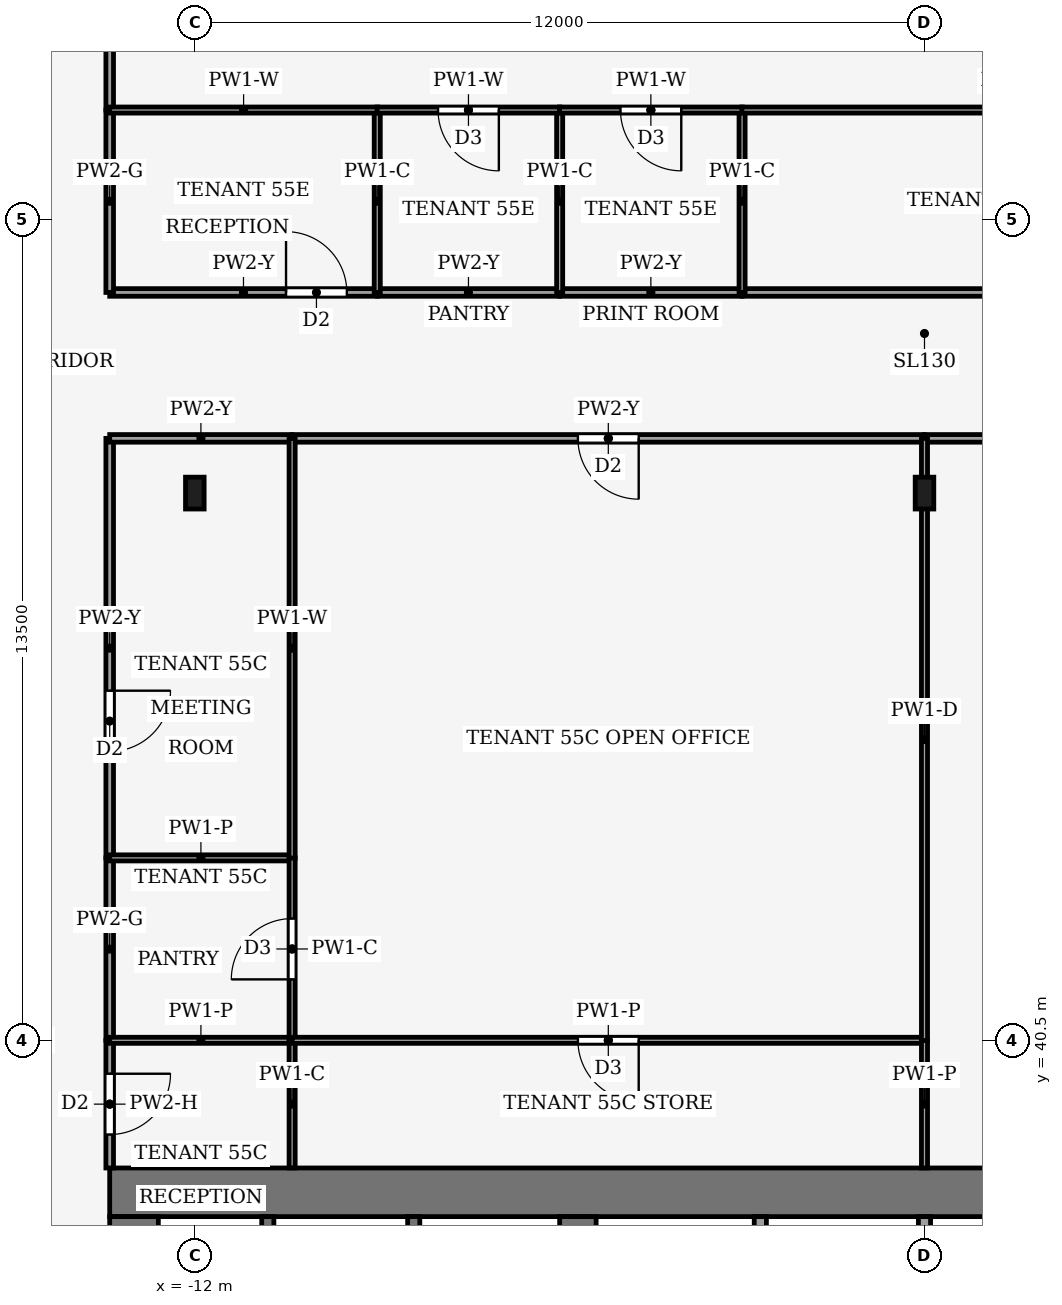
"""IFC4 building model, lengths in metres.
Left out: names, types, materials, properties, quantities, classifications, styles, units other than length and angle.
Written with IfcOpenShell. Run it as: python <this file> out.ifc"""

import sys

from ifc_helpers import new_model, si_unit, direction, frame, frame_2d, origin, origin_2d, place, context, subcontext, project, spatial, rectangle, i_section, extrude, element, fill, save


model = new_model("IFC4")
c1 = context("Model", 3, precision=1e-05, world=origin(), true_north=direction((0.0, 1.0)))
c2 = subcontext(c1, "Body", "Model", "MODEL_VIEW")
j1 = project(units=[si_unit("LENGTHUNIT", "METRE"), si_unit("PLANEANGLEUNIT", "RADIAN")], contexts=[c1])
p1 = place(None, origin())
s1 = spatial("IfcSite", under=j1, at=p1, CompositionType="ELEMENT")
p2 = place(p1, origin())
s2 = spatial("IfcBuilding", under=s1, at=p2, CompositionType="ELEMENT")
p3 = place(p2, frame((0.0, 0.0, 242.0)))
s3 = spatial("IfcBuildingStorey", under=s2, at=p3, CompositionType="ELEMENT", Elevation=242.0)
p4 = place(p3, frame((-13.4, 38.0, -0.13), z_axis=(0.0, 0.0, 1.0), x_axis=(1.0, 0.0, 0.0)))
e1 = element("IfcWall", 1, at=p4, inside=s3, PredefinedType="SHEAR", context=c2, shape_type="SweptSolid", body=[
    extrude(rectangle(XDim=26.8, YDim=0.8, at=frame_2d((13.4, 0.0))), origin(), (0.0, 0.0, 1.0), 4.0),
])
p5 = place(p3, frame((-13.0, 18.4, -0.13), z_axis=(0.0, 0.0, 1.0), x_axis=(0.0, 1.0, 0.0)))
e2 = element("IfcWall", 2, at=p5, inside=s3, PredefinedType="SHEAR", context=c2, shape_type="SweptSolid", body=[
    extrude(rectangle(XDim=19.2, YDim=0.8, at=frame_2d((9.6, 0.0))), origin(), (0.0, 0.0, 1.0), 4.0),
])
p6 = place(p5, frame((2.8, 0.0, 0.13)))
e3 = element("IfcOpeningElement", 3, at=p6, cuts=e2, PredefinedType="OPENING", context=c2, shape_type="SweptSolid", body=[
    extrude(rectangle(XDim=2.4, YDim=2.4, at=frame_2d((1.2, 1.2))), frame((0.0, 0.41, 0.0), z_axis=(0.0, -1.0, 0.0), x_axis=(1.0, 0.0, 0.0)), (0.0, 0.0, 1.0), 0.82),
])
p7 = place(p5, frame((13.4, 0.0, 0.13)))
e4 = element("IfcOpeningElement", 4, at=p7, cuts=e2, PredefinedType="OPENING", context=c2, shape_type="SweptSolid", body=[
    extrude(rectangle(XDim=1.4, YDim=2.2, at=frame_2d((0.7, 1.1))), frame((0.0, 0.41, 0.0), z_axis=(0.0, -1.0, 0.0), x_axis=(1.0, 0.0, 0.0)), (0.0, 0.0, 1.0), 0.82),
])
p8 = place(p3, frame((-5.7, 18.4, -0.13), z_axis=(0.0, 0.0, 1.0), x_axis=(0.0, 1.0, 0.0)))
e5 = element("IfcWall", 5, at=p8, inside=s3, PredefinedType="SHEAR", context=c2, shape_type="SweptSolid", body=[
    extrude(rectangle(XDim=19.2, YDim=0.6, at=frame_2d((9.6, 0.0))), origin(), (0.0, 0.0, 1.0), 4.0),
])
p9 = place(p8, frame((8.35, 0.0, 0.13)))
e6 = element("IfcOpeningElement", 6, at=p9, cuts=e5, PredefinedType="OPENING", context=c2, shape_type="SweptSolid", body=[
    extrude(rectangle(XDim=0.9, YDim=2.1, at=frame_2d((0.45, 1.05))), frame((0.0, 0.31, 0.0), z_axis=(0.0, -1.0, 0.0), x_axis=(1.0, 0.0, 0.0)), (0.0, 0.0, 1.0), 0.62),
])
for number, where, z_axis, x_axis in (
    (7, (-12.0, 49.5, 0.0), (0.0, 0.0, 1.0), (1.0, 0.0, 0.0)),
    (8, (0.0, 49.5, 0.0), (0.0, 0.0, 1.0), (1.0, 0.0, 0.0)),
):
    element("IfcColumn", number, at=place(p3, frame(where, z_axis=z_axis, x_axis=x_axis)), inside=s3, PredefinedType="COLUMN", context=c2, shape_type="SweptSolid", body=[
        extrude(i_section(OverallWidth=0.306, OverallDepth=0.524, WebThickness=0.012, FlangeThickness=0.04, FilletRadius=0.027, at=origin_2d()), origin(), (0.0, 0.0, 1.0), 4.0),
    ])
for number, where, z_axis, x_axis in (
    (9, (-10.8, 34.0, 0.0), (0.0, 0.0, 1.0), (0.0, 1.0, 0.0)),
    (10, (-8.4, 34.0, 0.0), (0.0, 0.0, 1.0), (0.0, 1.0, 0.0)),
    (11, (-2.7, 34.0, 0.0), (0.0, 0.0, 1.0), (0.0, 1.0, 0.0)),
    (12, (0.0, 34.0, 0.0), (0.0, 0.0, 1.0), (0.0, 1.0, 0.0)),
):
    element("IfcWall", number, at=place(p3, frame(where, z_axis=z_axis, x_axis=x_axis)), inside=s3, PredefinedType="PARTITIONING", context=c2, shape_type="SweptSolid", body=[
        extrude(rectangle(XDim=3.6, YDim=0.2, at=frame_2d((1.8, 0.0))), origin(), (0.0, 0.0, 1.0), 3.87),
    ])
p10 = place(p3, frame((-13.4, 40.5, 0.0), z_axis=(0.0, 0.0, 1.0), x_axis=(0.0, -1.0, 0.0)))
e13 = element("IfcWall", 13, at=p10, inside=s3, PredefinedType="PARTITIONING", context=c2, shape_type="SweptSolid", body=[
    extrude(rectangle(XDim=2.1, YDim=0.125, at=frame_2d((1.05, 0.0))), origin(), (0.0, 0.0, 1.0), 3.14),
])
p11 = place(p10, frame((0.55, 0.0, 0.0)))
e14 = element("IfcOpeningElement", 14, at=p11, cuts=e13, PredefinedType="OPENING", context=c2, shape_type="SweptSolid", body=[
    extrude(rectangle(XDim=1.0, YDim=2.1, at=frame_2d((0.5, 1.05))), frame((0.0, 0.073, 0.0), z_axis=(0.0, -1.0, 0.0), x_axis=(1.0, 0.0, 0.0)), (0.0, 0.0, 1.0), 0.145),
])
p12 = place(p3, frame((-13.4, 40.5, 0.0), z_axis=(0.0, 0.0, 1.0), x_axis=(0.0, 1.0, 0.0)))
e15 = element("IfcWall", 15, at=p12, inside=s3, PredefinedType="PARTITIONING", context=c2, shape_type="SweptSolid", body=[
    extrude(rectangle(XDim=3.0, YDim=0.125, at=frame_2d((1.5, 0.0))), origin(), (0.0, 0.0, 1.0), 3.87),
])
p13 = place(p3, frame((-13.4, 50.4, 0.0), z_axis=(0.0, 0.0, 1.0), x_axis=(0.0, -1.0, 0.0)))
e16 = element("IfcWall", 16, at=p13, inside=s3, PredefinedType="PARTITIONING", context=c2, shape_type="SweptSolid", body=[
    extrude(rectangle(XDim=6.9, YDim=0.125, at=frame_2d((3.45, 0.0))), origin(), (0.0, 0.0, 1.0), 3.24),
])
p14 = place(p13, frame((4.15, 0.0, 0.0)))
e17 = element("IfcOpeningElement", 17, at=p14, cuts=e16, PredefinedType="OPENING", context=c2, shape_type="SweptSolid", body=[
    extrude(rectangle(XDim=1.0, YDim=2.1, at=frame_2d((0.5, 1.05))), frame((0.0, 0.073, 0.0), z_axis=(0.0, -1.0, 0.0), x_axis=(1.0, 0.0, 0.0)), (0.0, 0.0, 1.0), 0.145),
])
p15 = place(p3, frame((-10.4, 50.4, 0.0), z_axis=(0.0, 0.0, 1.0), x_axis=(-1.0, 0.0, 0.0)))
e18 = element("IfcWall", 18, at=p15, inside=s3, PredefinedType="PARTITIONING", context=c2, shape_type="SweptSolid", body=[
    extrude(rectangle(XDim=3.0, YDim=0.125, at=frame_2d((1.5, 0.0))), origin(), (0.0, 0.0, 1.0), 3.24),
])
p16 = place(p3, frame((0.0, 50.4, 0.0), z_axis=(0.0, 0.0, 1.0), x_axis=(-1.0, 0.0, 0.0)))
e19 = element("IfcWall", 19, at=p16, inside=s3, PredefinedType="PARTITIONING", context=c2, shape_type="SweptSolid", body=[
    extrude(rectangle(XDim=10.4, YDim=0.125, at=frame_2d((5.2, 0.0))), origin(), (0.0, 0.0, 1.0), 3.24),
])
p17 = place(p16, frame((4.7, 0.0, 0.0)))
e20 = element("IfcOpeningElement", 20, at=p17, cuts=e19, PredefinedType="OPENING", context=c2, shape_type="SweptSolid", body=[
    extrude(rectangle(XDim=1.0, YDim=2.1, at=frame_2d((0.5, 1.05))), frame((0.0, 0.073, 0.0), z_axis=(0.0, -1.0, 0.0), x_axis=(1.0, 0.0, 0.0)), (0.0, 0.0, 1.0), 0.145),
])
p18 = place(p3, frame((10.4, 50.4, 0.0), z_axis=(0.0, 0.0, 1.0), x_axis=(-1.0, 0.0, 0.0)))
e21 = element("IfcWall", 21, at=p18, inside=s3, PredefinedType="PARTITIONING", context=c2, shape_type="SweptSolid", body=[
    extrude(rectangle(XDim=10.4, YDim=0.125, at=frame_2d((5.2, 0.0))), origin(), (0.0, 0.0, 1.0), 3.24),
])
p19 = place(p18, frame((4.7, 0.0, 0.0)))
e22 = element("IfcOpeningElement", 22, at=p19, cuts=e21, PredefinedType="OPENING", context=c2, shape_type="SweptSolid", body=[
    extrude(rectangle(XDim=1.0, YDim=2.1, at=frame_2d((0.5, 1.05))), frame((0.0, 0.073, 0.0), z_axis=(0.0, -1.0, 0.0), x_axis=(1.0, 0.0, 0.0)), (0.0, 0.0, 1.0), 0.145),
])
p20 = place(p3, frame((-13.4, 52.8, 0.0), z_axis=(0.0, 0.0, 1.0), x_axis=(1.0, 0.0, 0.0)))
e23 = element("IfcWall", 23, at=p20, inside=s3, PredefinedType="PARTITIONING", context=c2, shape_type="SweptSolid", body=[
    extrude(rectangle(XDim=4.4, YDim=0.125, at=frame_2d((2.2, 0.0))), origin(), (0.0, 0.0, 1.0), 3.24),
])
p21 = place(p20, frame((2.9, 0.0, 0.0)))
e24 = element("IfcOpeningElement", 24, at=p21, cuts=e23, PredefinedType="OPENING", context=c2, shape_type="SweptSolid", body=[
    extrude(rectangle(XDim=1.0, YDim=2.1, at=frame_2d((0.5, 1.05))), frame((0.0, 0.073, 0.0), z_axis=(0.0, -1.0, 0.0), x_axis=(1.0, 0.0, 0.0)), (0.0, 0.0, 1.0), 0.145),
])
p22 = place(p3, frame((-13.4, 52.8, 0.0), z_axis=(0.0, 0.0, 1.0), x_axis=(0.0, 1.0, 0.0)))
e25 = element("IfcWall", 25, at=p22, inside=s3, PredefinedType="PARTITIONING", context=c2, shape_type="SweptSolid", body=[
    extrude(rectangle(XDim=3.0, YDim=0.125, at=frame_2d((1.5, 0.0))), origin(), (0.0, 0.0, 1.0), 3.87),
])
for number, where, z_axis, x_axis in (
    (26, (-6.0, 52.8, 0.0), (0.0, 0.0, 1.0), (-1.0, 0.0, 0.0)),
    (27, (-3.0, 52.8, 0.0), (0.0, 0.0, 1.0), (-1.0, 0.0, 0.0)),
):
    element("IfcWall", number, at=place(p3, frame(where, z_axis=z_axis, x_axis=x_axis)), inside=s3, PredefinedType="PARTITIONING", context=c2, shape_type="SweptSolid", body=[
        extrude(rectangle(XDim=3.0, YDim=0.125, at=frame_2d((1.5, 0.0))), origin(), (0.0, 0.0, 1.0), 3.24),
    ])
p23 = place(p3, frame((-3.0, 52.8, 0.0), z_axis=(0.0, 0.0, 1.0), x_axis=(1.0, 0.0, 0.0)))
e28 = element("IfcWall", 28, at=p23, inside=s3, PredefinedType="PARTITIONING", context=c2, shape_type="SweptSolid", body=[
    extrude(rectangle(XDim=9.0, YDim=0.125, at=frame_2d((4.5, 0.0))), origin(), (0.0, 0.0, 1.0), 3.24),
])
p24 = place(p23, frame((4.8, 0.0, 0.0)))
e29 = element("IfcOpeningElement", 29, at=p24, cuts=e28, PredefinedType="OPENING", context=c2, shape_type="SweptSolid", body=[
    extrude(rectangle(XDim=1.0, YDim=2.1, at=frame_2d((0.5, 1.05))), frame((0.0, 0.073, 0.0), z_axis=(0.0, -1.0, 0.0), x_axis=(1.0, 0.0, 0.0)), (0.0, 0.0, 1.0), 0.145),
])
p25 = place(p3, frame((-13.4, 61.5, 0.0), z_axis=(0.0, 0.0, 1.0), x_axis=(0.0, -1.0, 0.0)))
e30 = element("IfcWall", 30, at=p25, inside=s3, PredefinedType="PARTITIONING", context=c2, shape_type="SweptSolid", body=[
    extrude(rectangle(XDim=5.7, YDim=0.125, at=frame_2d((2.85, 0.0))), origin(), (0.0, 0.0, 1.0), 3.87),
])
p26 = place(p25, frame((2.35, 0.0, 0.0)))
e31 = element("IfcOpeningElement", 31, at=p26, cuts=e30, PredefinedType="OPENING", context=c2, shape_type="SweptSolid", body=[
    extrude(rectangle(XDim=1.0, YDim=2.1, at=frame_2d((0.5, 1.05))), frame((0.0, 0.073, 0.0), z_axis=(0.0, -1.0, 0.0), x_axis=(1.0, 0.0, 0.0)), (0.0, 0.0, 1.0), 0.145),
])
p27 = place(p3, frame((-10.4, 40.5, 0.0), z_axis=(0.0, 0.0, 1.0), x_axis=(-1.0, 0.0, 0.0)))
e32 = element("IfcWall", 32, at=p27, inside=s3, PredefinedType="PARTITIONING", context=c2, shape_type="SweptSolid", body=[
    extrude(rectangle(XDim=3.0, YDim=0.1, at=frame_2d((1.5, 0.0))), origin(), (0.0, 0.0, 1.0), 3.44),
])
p28 = place(p3, frame((-10.4, 38.4, 0.0), z_axis=(0.0, 0.0, 1.0), x_axis=(0.0, 1.0, 0.0)))
e33 = element("IfcWall", 33, at=p28, inside=s3, PredefinedType="PARTITIONING", context=c2, shape_type="SweptSolid", body=[
    extrude(rectangle(XDim=2.1, YDim=0.1, at=frame_2d((1.05, 0.0))), origin(), (0.0, 0.0, 1.0), 3.87),
])
p29 = place(p3, frame((-10.4, 43.5, 0.0), z_axis=(0.0, 0.0, 1.0), x_axis=(-1.0, 0.0, 0.0)))
e34 = element("IfcWall", 34, at=p29, inside=s3, PredefinedType="PARTITIONING", context=c2, shape_type="SweptSolid", body=[
    extrude(rectangle(XDim=3.0, YDim=0.1, at=frame_2d((1.5, 0.0))), origin(), (0.0, 0.0, 1.0), 3.44),
])
p30 = place(p3, frame((-10.4, 40.5, 0.0), z_axis=(0.0, 0.0, 1.0), x_axis=(0.0, 1.0, 0.0)))
e35 = element("IfcWall", 35, at=p30, inside=s3, PredefinedType="PARTITIONING", context=c2, shape_type="SweptSolid", body=[
    extrude(rectangle(XDim=3.004, YDim=0.1, at=frame_2d((1.502, 0.0))), origin(), (0.0, 0.0, 1.0), 3.87),
])
p31 = place(p30, frame((1.002, 0.0, 0.0)))
e36 = element("IfcOpeningElement", 36, at=p31, cuts=e35, PredefinedType="OPENING", context=c2, shape_type="SweptSolid", body=[
    extrude(rectangle(XDim=1.0, YDim=2.1, at=frame_2d((0.5, 1.05))), frame((0.0, 0.06, 0.0), z_axis=(0.0, -1.0, 0.0), x_axis=(1.0, 0.0, 0.0)), (0.0, 0.0, 1.0), 0.12),
])
p32 = place(p3, frame((-10.4, 43.496, 0.0), z_axis=(0.0, 0.0, 1.0), x_axis=(0.0, 1.0, 0.0)))
e37 = element("IfcWall", 37, at=p32, inside=s3, PredefinedType="PARTITIONING", context=c2, shape_type="SweptSolid", body=[
    extrude(rectangle(XDim=6.904, YDim=0.1, at=frame_2d((3.452, 0.0))), origin(), (0.0, 0.0, 1.0), 3.24),
])
p33 = place(p3, frame((0.0, 40.5, 0.0), z_axis=(0.0, 0.0, 1.0), x_axis=(-1.0, 0.0, 0.0)))
e38 = element("IfcWall", 38, at=p33, inside=s3, PredefinedType="PARTITIONING", context=c2, shape_type="SweptSolid", body=[
    extrude(rectangle(XDim=10.4, YDim=0.1, at=frame_2d((5.2, 0.0))), origin(), (0.0, 0.0, 1.0), 3.44),
])
p34 = place(p33, frame((4.7, 0.0, 0.0)))
e39 = element("IfcOpeningElement", 39, at=p34, cuts=e38, PredefinedType="OPENING", context=c2, shape_type="SweptSolid", body=[
    extrude(rectangle(XDim=1.0, YDim=2.1, at=frame_2d((0.5, 1.05))), frame((0.0, 0.06, 0.0), z_axis=(0.0, -1.0, 0.0), x_axis=(1.0, 0.0, 0.0)), (0.0, 0.0, 1.0), 0.12),
])
p35 = place(p3, frame((0.0, 38.4, 0.0), z_axis=(0.0, 0.0, 1.0), x_axis=(0.0, 1.0, 0.0)))
e40 = element("IfcWall", 40, at=p35, inside=s3, PredefinedType="PARTITIONING", context=c2, shape_type="SweptSolid", body=[
    extrude(rectangle(XDim=2.104, YDim=0.1, at=frame_2d((1.052, 0.0))), origin(), (0.0, 0.0, 1.0), 3.44),
])
p36 = place(p3, frame((0.0, 40.496, 0.0), z_axis=(0.0, 0.0, 1.0), x_axis=(0.0, 1.0, 0.0)))
e41 = element("IfcWall", 41, at=p36, inside=s3, PredefinedType="PARTITIONING", context=c2, shape_type="SweptSolid", body=[
    extrude(rectangle(XDim=9.904, YDim=0.1, at=frame_2d((4.952, 0.0))), origin(), (0.0, 0.0, 1.0), 3.29),
])
p37 = place(p3, frame((-9.0, 52.8, 0.0), z_axis=(0.0, 0.0, 1.0), x_axis=(0.0, 1.0, 0.0)))
e42 = element("IfcWall", 42, at=p37, inside=s3, PredefinedType="PARTITIONING", context=c2, shape_type="SweptSolid", body=[
    extrude(rectangle(XDim=3.0, YDim=0.1, at=frame_2d((1.5, 0.0))), origin(), (0.0, 0.0, 1.0), 3.87),
])
p38 = place(p3, frame((-8.996, 55.8, 0.0), z_axis=(0.0, 0.0, 1.0), x_axis=(-1.0, 0.0, 0.0)))
e43 = element("IfcWall", 43, at=p38, inside=s3, PredefinedType="PARTITIONING", context=c2, shape_type="SweptSolid", body=[
    extrude(rectangle(XDim=4.404, YDim=0.1, at=frame_2d((2.202, 0.0))), origin(), (0.0, 0.0, 1.0), 3.24),
])
p39 = place(p3, frame((-6.0, 52.8, 0.0), z_axis=(0.0, 0.0, 1.0), x_axis=(0.0, 1.0, 0.0)))
e44 = element("IfcWall", 44, at=p39, inside=s3, PredefinedType="PARTITIONING", context=c2, shape_type="SweptSolid", body=[
    extrude(rectangle(XDim=3.0, YDim=0.1, at=frame_2d((1.5, 0.0))), origin(), (0.0, 0.0, 1.0), 3.87),
])
p40 = place(p3, frame((-5.996, 55.8, 0.0), z_axis=(0.0, 0.0, 1.0), x_axis=(-1.0, 0.0, 0.0)))
e45 = element("IfcWall", 45, at=p40, inside=s3, PredefinedType="PARTITIONING", context=c2, shape_type="SweptSolid", body=[
    extrude(rectangle(XDim=3.008, YDim=0.1, at=frame_2d((1.504, 0.0))), origin(), (0.0, 0.0, 1.0), 3.24),
])
p41 = place(p40, frame((1.004, 0.0, 0.0)))
e46 = element("IfcOpeningElement", 46, at=p41, cuts=e45, PredefinedType="OPENING", context=c2, shape_type="SweptSolid", body=[
    extrude(rectangle(XDim=1.0, YDim=2.1, at=frame_2d((0.5, 1.05))), frame((0.0, 0.06, 0.0), z_axis=(0.0, -1.0, 0.0), x_axis=(1.0, 0.0, 0.0)), (0.0, 0.0, 1.0), 0.12),
])
p42 = place(p3, frame((-3.0, 52.8, 0.0), z_axis=(0.0, 0.0, 1.0), x_axis=(0.0, 1.0, 0.0)))
e47 = element("IfcWall", 47, at=p42, inside=s3, PredefinedType="PARTITIONING", context=c2, shape_type="SweptSolid", body=[
    extrude(rectangle(XDim=3.0, YDim=0.1, at=frame_2d((1.5, 0.0))), origin(), (0.0, 0.0, 1.0), 3.87),
])
p43 = place(p3, frame((-2.996, 55.8, 0.0), z_axis=(0.0, 0.0, 1.0), x_axis=(-1.0, 0.0, 0.0)))
e48 = element("IfcWall", 48, at=p43, inside=s3, PredefinedType="PARTITIONING", context=c2, shape_type="SweptSolid", body=[
    extrude(rectangle(XDim=3.008, YDim=0.1, at=frame_2d((1.504, 0.0))), origin(), (0.0, 0.0, 1.0), 3.24),
])
p44 = place(p43, frame((1.004, 0.0, 0.0)))
e49 = element("IfcOpeningElement", 49, at=p44, cuts=e48, PredefinedType="OPENING", context=c2, shape_type="SweptSolid", body=[
    extrude(rectangle(XDim=1.0, YDim=2.1, at=frame_2d((0.5, 1.05))), frame((0.0, 0.06, 0.0), z_axis=(0.0, -1.0, 0.0), x_axis=(1.0, 0.0, 0.0)), (0.0, 0.0, 1.0), 0.12),
])
p45 = place(p3, frame((6.004, 55.8, 0.0), z_axis=(0.0, 0.0, 1.0), x_axis=(-1.0, 0.0, 0.0)))
e50 = element("IfcWall", 50, at=p45, inside=s3, PredefinedType="PARTITIONING", context=c2, shape_type="SweptSolid", body=[
    extrude(rectangle(XDim=9.008, YDim=0.1, at=frame_2d((4.504, 0.0))), origin(), (0.0, 0.0, 1.0), 3.24),
])
p46 = place(p11, origin())
e51 = element("IfcDoor", 51, at=p46, inside=s3, OperationType="SINGLE_SWING_LEFT", PredefinedType="DOOR", context=c2, shape_type="SweptSolid", body=[
    extrude(rectangle(XDim=1.0, YDim=2.1, at=frame_2d((0.5, 1.05))), frame((0.0, 0.025, 0.0), z_axis=(0.0, -1.0, 0.0), x_axis=(1.0, 0.0, 0.0)), (0.0, 0.0, 1.0), 0.05),
])
fill(e14, e51)
p47 = place(p14, origin())
e52 = element("IfcDoor", 52, at=p47, inside=s3, OperationType="SINGLE_SWING_RIGHT", PredefinedType="DOOR", context=c2, shape_type="SweptSolid", body=[
    extrude(rectangle(XDim=1.0, YDim=2.1, at=frame_2d((0.5, 1.05))), frame((0.0, 0.025, 0.0), z_axis=(0.0, -1.0, 0.0), x_axis=(1.0, 0.0, 0.0)), (0.0, 0.0, 1.0), 0.05),
])
fill(e17, e52)
p48 = place(p17, origin())
e53 = element("IfcDoor", 53, at=p48, inside=s3, OperationType="SINGLE_SWING_LEFT", PredefinedType="DOOR", context=c2, shape_type="SweptSolid", body=[
    extrude(rectangle(XDim=1.0, YDim=2.1, at=frame_2d((0.5, 1.05))), frame((0.0, 0.025, 0.0), z_axis=(0.0, -1.0, 0.0), x_axis=(1.0, 0.0, 0.0)), (0.0, 0.0, 1.0), 0.05),
])
fill(e20, e53)
p49 = place(p21, origin())
e54 = element("IfcDoor", 54, at=p49, inside=s3, OperationType="SINGLE_SWING_RIGHT", PredefinedType="DOOR", context=c2, shape_type="SweptSolid", body=[
    extrude(rectangle(XDim=1.0, YDim=2.1, at=frame_2d((0.5, 1.05))), frame((0.0, 0.025, 0.0), z_axis=(0.0, -1.0, 0.0), x_axis=(1.0, 0.0, 0.0)), (0.0, 0.0, 1.0), 0.05),
])
fill(e24, e54)
p50 = place(p31, origin())
e55 = element("IfcDoor", 55, at=p50, inside=s3, OperationType="SINGLE_SWING_LEFT", PredefinedType="DOOR", context=c2, shape_type="SweptSolid", body=[
    extrude(rectangle(XDim=1.0, YDim=2.1, at=frame_2d((0.5, 1.05))), frame((0.0, 0.025, 0.0), z_axis=(0.0, -1.0, 0.0), x_axis=(1.0, 0.0, 0.0)), (0.0, 0.0, 1.0), 0.05),
])
fill(e36, e55)
p51 = place(p34, origin())
e56 = element("IfcDoor", 56, at=p51, inside=s3, OperationType="SINGLE_SWING_RIGHT", PredefinedType="DOOR", context=c2, shape_type="SweptSolid", body=[
    extrude(rectangle(XDim=1.0, YDim=2.1, at=frame_2d((0.5, 1.05))), frame((0.0, 0.025, 0.0), z_axis=(0.0, -1.0, 0.0), x_axis=(1.0, 0.0, 0.0)), (0.0, 0.0, 1.0), 0.05),
])
fill(e39, e56)
p52 = place(p41, origin())
e57 = element("IfcDoor", 57, at=p52, inside=s3, OperationType="SINGLE_SWING_RIGHT", PredefinedType="DOOR", context=c2, shape_type="SweptSolid", body=[
    extrude(rectangle(XDim=1.0, YDim=2.1, at=frame_2d((0.5, 1.05))), frame((0.0, 0.025, 0.0), z_axis=(0.0, -1.0, 0.0), x_axis=(1.0, 0.0, 0.0)), (0.0, 0.0, 1.0), 0.05),
])
fill(e46, e57)
p53 = place(p44, origin())
e58 = element("IfcDoor", 58, at=p53, inside=s3, OperationType="SINGLE_SWING_LEFT", PredefinedType="DOOR", context=c2, shape_type="SweptSolid", body=[
    extrude(rectangle(XDim=1.0, YDim=2.1, at=frame_2d((0.5, 1.05))), frame((0.0, 0.025, 0.0), z_axis=(0.0, -1.0, 0.0), x_axis=(1.0, 0.0, 0.0)), (0.0, 0.0, 1.0), 0.05),
])
fill(e49, e58)
save(model, sys.argv[1])
